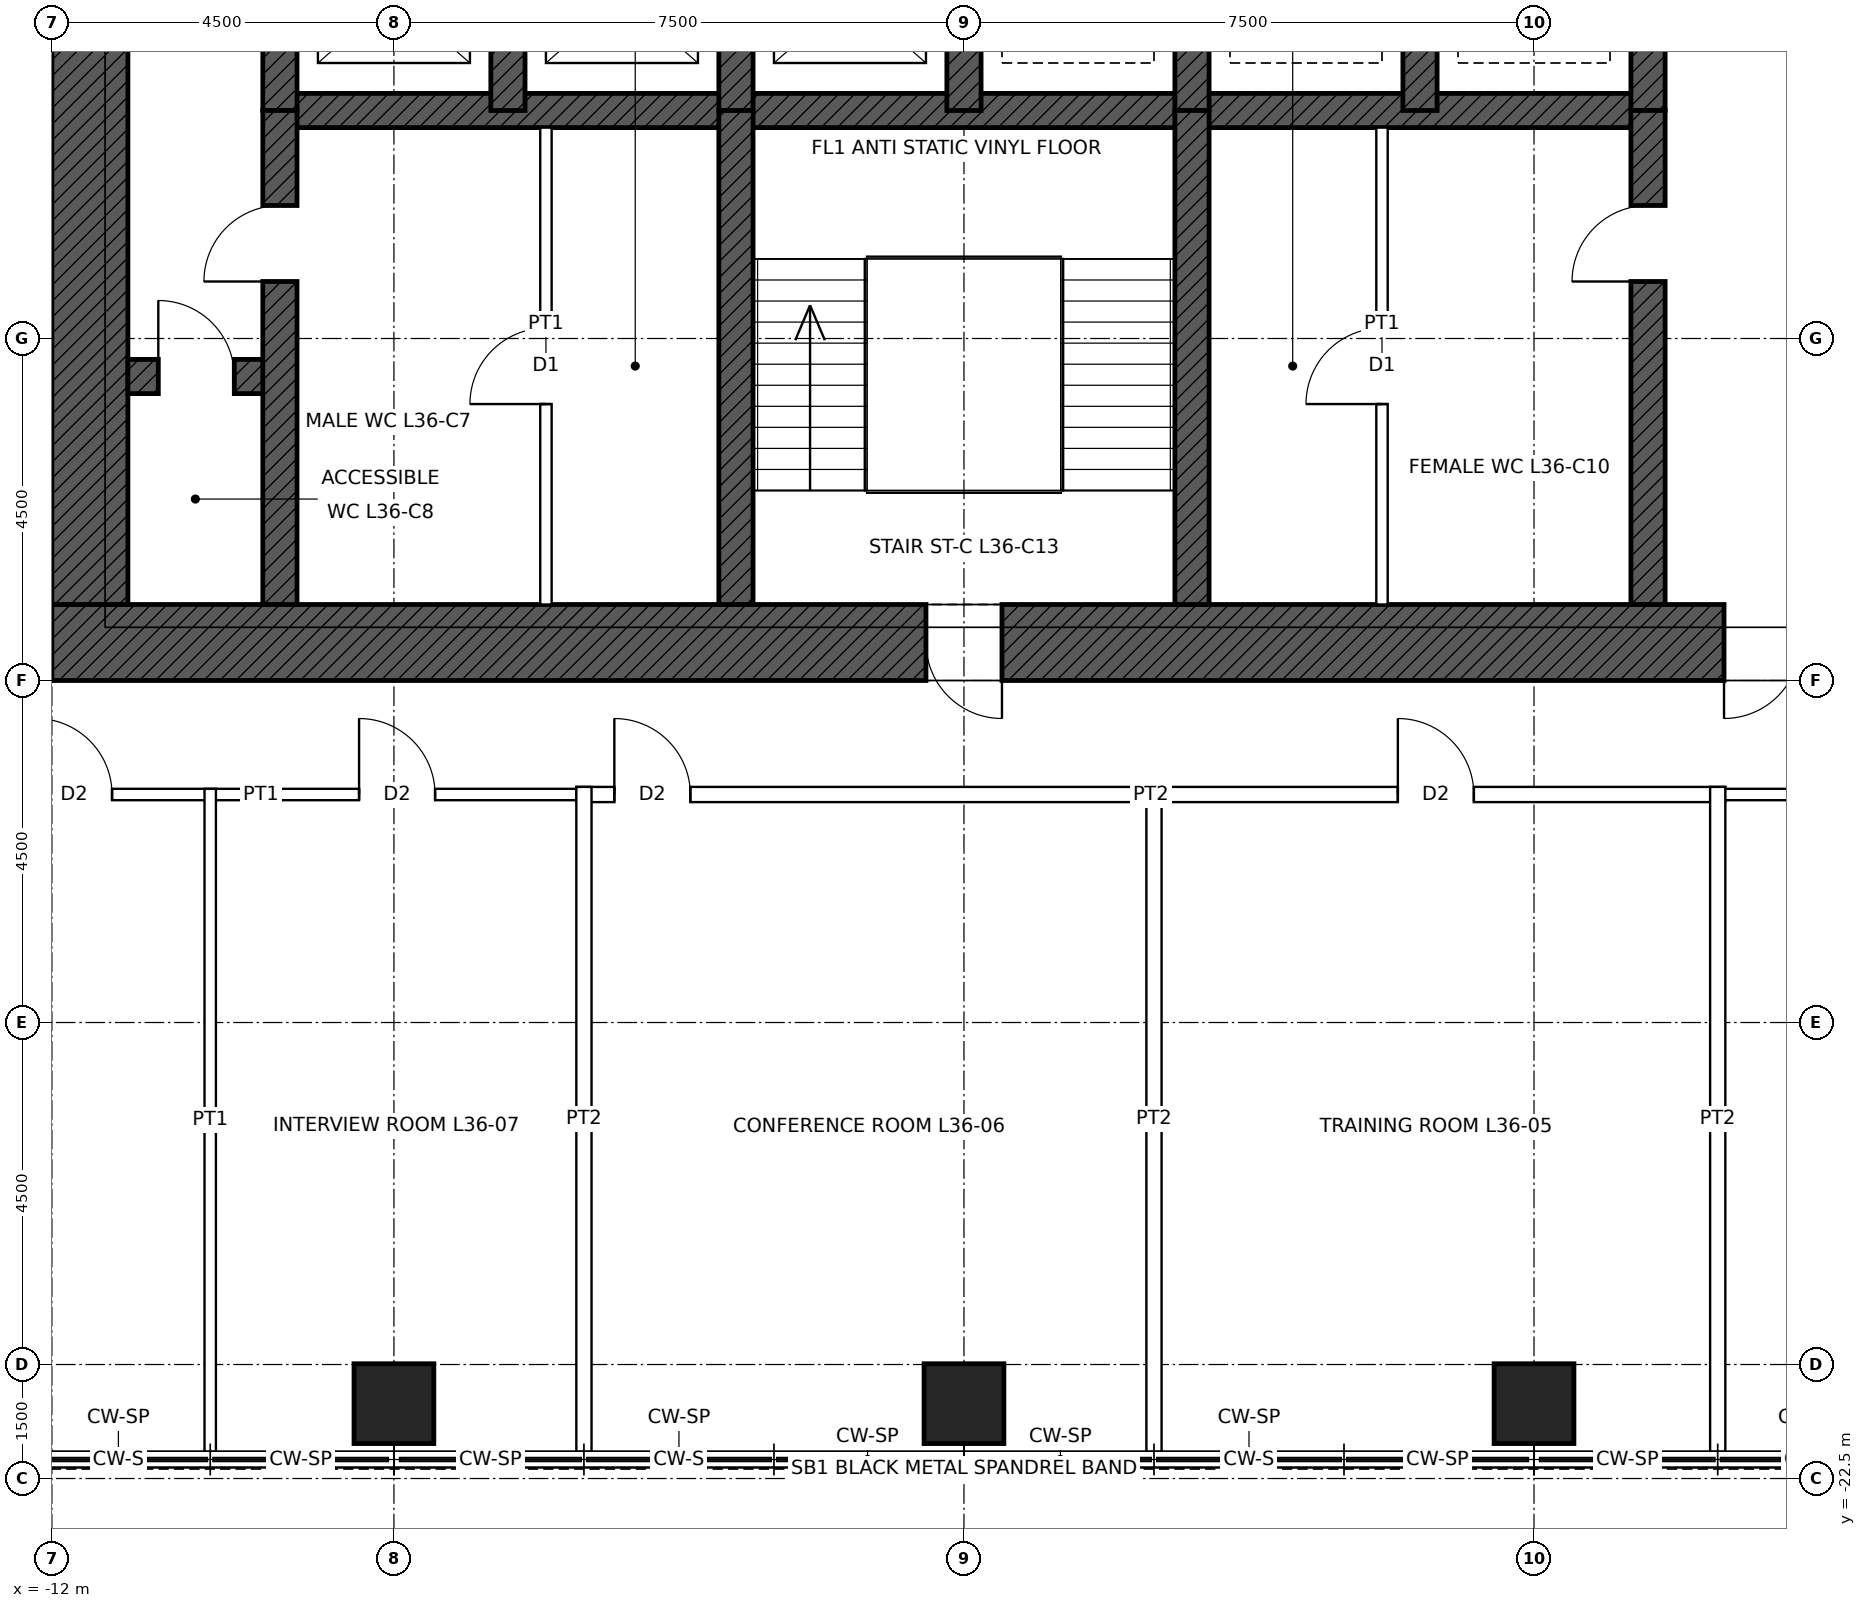
"""IFC4 building model, lengths in metres.
Left out: names, types, materials, properties, quantities, classifications, styles, units other than length and angle.
Written with IfcOpenShell. Run it as: python <this file> out.ifc"""

import sys

from ifc_helpers import new_model, si_unit, direction, frame, frame_2d, origin, origin_2d, place, context, subcontext, project, spatial, rectangle, hollow_rectangle, extrude, element, fill, save


model = new_model("IFC4")
c1 = context("Model", 3, precision=1e-05, world=origin(), true_north=direction((0.0, 1.0)))
c2 = subcontext(c1, "Body", "Model", "MODEL_VIEW")
j1 = project(units=[si_unit("LENGTHUNIT", "METRE"), si_unit("PLANEANGLEUNIT", "RADIAN")], contexts=[c1])
p1 = place(None, origin())
s1 = spatial("IfcSite", under=j1, at=p1, CompositionType="ELEMENT")
p2 = place(p1, origin())
s2 = spatial("IfcBuilding", under=s1, at=p2, CompositionType="ELEMENT")
p3 = place(p2, frame((0.0, 0.0, 177.9)))
s3 = spatial("IfcBuildingStorey", under=s2, at=p3, CompositionType="ELEMENT", Elevation=177.9)
p4 = place(p3, frame((7.5, -21.515, 0.0), z_axis=(0.0, 0.0, 1.0), x_axis=(1.0, 0.0, 0.0)))
e1 = element("IfcColumn", 1, at=p4, inside=s3, PredefinedType="COLUMN", context=c2, shape_type="SweptSolid", body=[
    extrude(hollow_rectangle(XDim=1.05, YDim=1.05, WallThickness=0.075, at=origin_2d()), origin(), (0.0, 0.0, 1.0), 4.0),
])
p5 = place(p3, frame((0.0, -21.515, 0.0), z_axis=(0.0, 0.0, 1.0), x_axis=(1.0, 0.0, 0.0)))
e2 = element("IfcColumn", 2, at=p5, inside=s3, PredefinedType="COLUMN", context=c2, shape_type="SweptSolid", body=[
    extrude(hollow_rectangle(XDim=1.05, YDim=1.05, WallThickness=0.07, at=origin_2d()), origin(), (0.0, 0.0, 1.0), 4.0),
])
p6 = place(p3, frame((-7.5, -21.515, 0.0), z_axis=(0.0, 0.0, 1.0), x_axis=(1.0, 0.0, 0.0)))
e3 = element("IfcColumn", 3, at=p6, inside=s3, PredefinedType="COLUMN", context=c2, shape_type="SweptSolid", body=[
    extrude(hollow_rectangle(XDim=1.05, YDim=1.05, WallThickness=0.075, at=origin_2d()), origin(), (0.0, 0.0, 1.0), 4.0),
])
p7 = place(p3, frame((12.0, -11.5, 0.0), z_axis=(0.0, 0.0, 1.0), x_axis=(-1.0, 0.0, 0.0)))
e4 = element("IfcWall", 4, at=p7, inside=s3, PredefinedType="SHEAR", context=c2, shape_type="SweptSolid", body=[
    extrude(rectangle(XDim=24.0, YDim=1.0, at=frame_2d((12.0, 0.0))), origin(), (0.0, 0.0, 1.0), 4.0),
])
p8 = place(p7, frame((11.5, 0.0, 0.0)))
e5 = element("IfcOpeningElement", 5, at=p8, cuts=e4, PredefinedType="OPENING", context=c2, shape_type="SweptSolid", body=[
    extrude(rectangle(XDim=1.0, YDim=2.1, at=frame_2d((0.5, 1.05))), frame((0.0, 0.51, 0.0), z_axis=(0.0, -1.0, 0.0), x_axis=(1.0, 0.0, 0.0)), (0.0, 0.0, 1.0), 1.02),
])
p9 = place(p7, frame((1.0, 0.0, 0.0)))
e6 = element("IfcOpeningElement", 6, at=p9, cuts=e4, PredefinedType="OPENING", context=c2, shape_type="SweptSolid", body=[
    extrude(rectangle(XDim=1.0, YDim=2.4, at=frame_2d((0.5, 1.2))), frame((0.0, 0.51, 0.0), z_axis=(0.0, -1.0, 0.0), x_axis=(1.0, 0.0, 0.0)), (0.0, 0.0, 1.0), 1.02),
])
p10 = place(p3, frame((-11.5, -11.0, 0.0), z_axis=(0.0, 0.0, 1.0), x_axis=(0.0, 1.0, 0.0)))
e7 = element("IfcWall", 7, at=p10, inside=s3, PredefinedType="SHEAR", context=c2, shape_type="SweptSolid", body=[
    extrude(rectangle(XDim=22.0, YDim=1.0, at=frame_2d((11.0, 0.0))), origin(), (0.0, 0.0, 1.0), 4.0),
])
p11 = place(p10, frame((10.5, 0.0, 0.0)))
e8 = element("IfcOpeningElement", 8, at=p11, cuts=e7, PredefinedType="OPENING", context=c2, shape_type="SweptSolid", body=[
    extrude(rectangle(XDim=1.0, YDim=2.4, at=frame_2d((0.5, 1.2))), frame((0.0, 0.51, 0.0), z_axis=(0.0, -1.0, 0.0), x_axis=(1.0, 0.0, 0.0)), (0.0, 0.0, 1.0), 1.02),
])
p12 = place(p3, frame((-9.0, -4.5, 0.0), z_axis=(0.0, 0.0, 1.0), x_axis=(1.0, 0.0, 0.0)))
e9 = element("IfcWall", 9, at=p12, inside=s3, PredefinedType="SHEAR", context=c2, shape_type="SweptSolid", body=[
    extrude(rectangle(XDim=18.0, YDim=0.45, at=frame_2d((9.0, 0.0))), origin(), (0.0, 0.0, 1.0), 4.0),
])
p13 = place(p3, frame((-11.0, -8.0, 0.0), z_axis=(0.0, 0.0, 1.0), x_axis=(1.0, 0.0, 0.0)))
e10 = element("IfcWall", 10, at=p13, inside=s3, PredefinedType="SHEAR", context=c2, shape_type="SweptSolid", body=[
    extrude(rectangle(XDim=2.0, YDim=0.45, at=frame_2d((1.0, 0.0))), origin(), (0.0, 0.0, 1.0), 4.0),
])
p14 = place(p13, frame((0.4, 0.0, 0.0)))
e11 = element("IfcOpeningElement", 11, at=p14, cuts=e10, PredefinedType="OPENING", context=c2, shape_type="SweptSolid", body=[
    extrude(rectangle(XDim=1.0, YDim=2.1, at=frame_2d((0.5, 1.05))), frame((0.0, 0.235, 0.0), z_axis=(0.0, -1.0, 0.0), x_axis=(1.0, 0.0, 0.0)), (0.0, 0.0, 1.0), 0.47),
])
for number, where, z_axis, x_axis in (
    (12, (-9.0, -4.5, 0.0), (0.0, 0.0, 1.0), (0.0, 1.0, 0.0)),
    (13, (9.0, -4.5, 0.0), (0.0, 0.0, 1.0), (0.0, 1.0, 0.0)),
    (14, (-6.0, -4.5, 0.0), (0.0, 0.0, 1.0), (0.0, 1.0, 0.0)),
    (15, (-3.0, -4.5, 0.0), (0.0, 0.0, 1.0), (0.0, 1.0, 0.0)),
    (16, (0.0, -4.5, 0.0), (0.0, 0.0, 1.0), (0.0, 1.0, 0.0)),
    (17, (3.0, -4.5, 0.0), (0.0, 0.0, 1.0), (0.0, 1.0, 0.0)),
    (18, (6.0, -4.5, 0.0), (0.0, 0.0, 1.0), (0.0, 1.0, 0.0)),
):
    element("IfcWall", number, at=place(p3, frame(where, z_axis=z_axis, x_axis=x_axis)), inside=s3, PredefinedType="SHEAR", context=c2, shape_type="SweptSolid", body=[
        extrude(rectangle(XDim=3.0, YDim=0.45, at=frame_2d((1.5, 0.0))), origin(), (0.0, 0.0, 1.0), 4.0),
    ])
p15 = place(p3, frame((-9.0, -11.0, 0.0), z_axis=(0.0, 0.0, 1.0), x_axis=(0.0, 1.0, 0.0)))
e19 = element("IfcWall", 19, at=p15, inside=s3, PredefinedType="SHEAR", context=c2, shape_type="SweptSolid", body=[
    extrude(rectangle(XDim=6.5, YDim=0.45, at=frame_2d((3.25, 0.0))), origin(), (0.0, 0.0, 1.0), 4.0),
])
p16 = place(p15, frame((4.25, 0.0, 0.0)))
e20 = element("IfcOpeningElement", 20, at=p16, cuts=e19, PredefinedType="OPENING", context=c2, shape_type="SweptSolid", body=[
    extrude(rectangle(XDim=1.0, YDim=2.1, at=frame_2d((0.5, 1.05))), frame((0.0, 0.235, 0.0), z_axis=(0.0, -1.0, 0.0), x_axis=(1.0, 0.0, 0.0)), (0.0, 0.0, 1.0), 0.47),
])
p17 = place(p3, frame((9.0, -11.0, 0.0), z_axis=(0.0, 0.0, 1.0), x_axis=(0.0, 1.0, 0.0)))
e21 = element("IfcWall", 21, at=p17, inside=s3, PredefinedType="SHEAR", context=c2, shape_type="SweptSolid", body=[
    extrude(rectangle(XDim=6.5, YDim=0.45, at=frame_2d((3.25, 0.0))), origin(), (0.0, 0.0, 1.0), 4.0),
])
p18 = place(p17, frame((4.25, 0.0, 0.0)))
e22 = element("IfcOpeningElement", 22, at=p18, cuts=e21, PredefinedType="OPENING", context=c2, shape_type="SweptSolid", body=[
    extrude(rectangle(XDim=1.0, YDim=2.1, at=frame_2d((0.5, 1.05))), frame((0.0, 0.235, 0.0), z_axis=(0.0, -1.0, 0.0), x_axis=(1.0, 0.0, 0.0)), (0.0, 0.0, 1.0), 0.47),
])
for number, where, z_axis, x_axis in (
    (23, (-3.0, -11.0, 0.0), (0.0, 0.0, 1.0), (0.0, 1.0, 0.0)),
    (24, (3.0, -11.0, 0.0), (0.0, 0.0, 1.0), (0.0, 1.0, 0.0)),
):
    element("IfcWall", number, at=place(p3, frame(where, z_axis=z_axis, x_axis=x_axis)), inside=s3, PredefinedType="SHEAR", context=c2, shape_type="SweptSolid", body=[
        extrude(rectangle(XDim=6.5, YDim=0.45, at=frame_2d((3.25, 0.0))), origin(), (0.0, 0.0, 1.0), 4.0),
    ])
p19 = place(p3, frame((-13.575, -13.5, 0.0), z_axis=(0.0, 0.0, 1.0), x_axis=(1.0, 0.0, 0.0)))
e25 = element("IfcWall", 25, at=p19, inside=s3, PredefinedType="PARTITIONING", context=c2, shape_type="SweptSolid", body=[
    extrude(rectangle(XDim=8.65, YDim=0.15, at=frame_2d((4.325, 0.0))), origin(), (0.0, 0.0, 1.0), 3.85),
])
p20 = place(p19, frame((5.616, 0.0, 0.0)))
e26 = element("IfcOpeningElement", 26, at=p20, cuts=e25, PredefinedType="OPENING", context=c2, shape_type="SweptSolid", body=[
    extrude(rectangle(XDim=1.0, YDim=2.1, at=frame_2d((0.5, 1.05))), frame((0.0, 0.085, 0.0), z_axis=(0.0, -1.0, 0.0), x_axis=(1.0, 0.0, 0.0)), (0.0, 0.0, 1.0), 0.17),
])
p21 = place(p19, frame((1.366, 0.0, 0.0)))
e27 = element("IfcOpeningElement", 27, at=p21, cuts=e25, PredefinedType="OPENING", context=c2, shape_type="SweptSolid", body=[
    extrude(rectangle(XDim=1.0, YDim=2.1, at=frame_2d((0.5, 1.05))), frame((0.0, 0.085, 0.0), z_axis=(0.0, -1.0, 0.0), x_axis=(1.0, 0.0, 0.0)), (0.0, 0.0, 1.0), 0.17),
])
p22 = place(p3, frame((-5.1, -13.5, 0.0), z_axis=(0.0, 0.0, 1.0), x_axis=(1.0, 0.0, 0.0)))
e28 = element("IfcWall", 28, at=p22, inside=s3, PredefinedType="PARTITIONING", context=c2, shape_type="SweptSolid", body=[
    extrude(rectangle(XDim=15.117, YDim=0.2, at=frame_2d((7.559, 0.0))), origin(), (0.0, 0.0, 1.0), 3.85),
])
p23 = place(p22, frame((10.809, 0.0, 0.0)))
e29 = element("IfcOpeningElement", 29, at=p23, cuts=e28, PredefinedType="OPENING", context=c2, shape_type="SweptSolid", body=[
    extrude(rectangle(XDim=1.0, YDim=2.1, at=frame_2d((0.5, 1.05))), frame((0.0, 0.11, 0.0), z_axis=(0.0, -1.0, 0.0), x_axis=(1.0, 0.0, 0.0)), (0.0, 0.0, 1.0), 0.22),
])
p24 = place(p22, frame((0.5, 0.0, 0.0)))
e30 = element("IfcOpeningElement", 30, at=p24, cuts=e28, PredefinedType="OPENING", context=c2, shape_type="SweptSolid", body=[
    extrude(rectangle(XDim=1.0, YDim=2.1, at=frame_2d((0.5, 1.05))), frame((0.0, 0.11, 0.0), z_axis=(0.0, -1.0, 0.0), x_axis=(1.0, 0.0, 0.0)), (0.0, 0.0, 1.0), 0.22),
])
p25 = place(p3, frame((9.842, -13.5, 0.0), z_axis=(0.0, 0.0, 1.0), x_axis=(1.0, 0.0, 0.0)))
e31 = element("IfcWall", 31, at=p25, inside=s3, PredefinedType="PARTITIONING", context=c2, shape_type="SweptSolid", body=[
    extrude(rectangle(XDim=3.733, YDim=0.15, at=frame_2d((1.866, 0.0))), origin(), (0.0, 0.0, 1.0), 3.85),
])
p26 = place(p25, frame((1.901, 0.0, 0.0)))
e32 = element("IfcOpeningElement", 32, at=p26, cuts=e31, PredefinedType="OPENING", context=c2, shape_type="SweptSolid", body=[
    extrude(rectangle(XDim=1.0, YDim=2.1, at=frame_2d((0.5, 1.05))), frame((0.0, 0.085, 0.0), z_axis=(0.0, -1.0, 0.0), x_axis=(1.0, 0.0, 0.0)), (0.0, 0.0, 1.0), 0.17),
])
p27 = place(p3, frame((-9.917, -22.15, 0.0), z_axis=(0.0, 0.0, 1.0), x_axis=(0.0, 1.0, 0.0)))
e33 = element("IfcWall", 33, at=p27, inside=s3, PredefinedType="PARTITIONING", context=c2, shape_type="SweptSolid", body=[
    extrude(rectangle(XDim=8.725, YDim=0.15, at=frame_2d((4.362, 0.0))), origin(), (0.0, 0.0, 1.0), 3.85),
])
for number, where, z_axis, x_axis in (
    (34, (-5.0, -22.15, 0.0), (0.0, 0.0, 1.0), (0.0, 1.0, 0.0)),
    (35, (2.5, -22.15, 0.0), (0.0, 0.0, 1.0), (0.0, 1.0, 0.0)),
    (36, (9.917, -22.15, 0.0), (0.0, 0.0, 1.0), (0.0, 1.0, 0.0)),
):
    element("IfcWall", number, at=place(p3, frame(where, z_axis=z_axis, x_axis=x_axis)), inside=s3, PredefinedType="PARTITIONING", context=c2, shape_type="SweptSolid", body=[
        extrude(rectangle(XDim=8.75, YDim=0.2, at=frame_2d((4.375, 0.0))), origin(), (0.0, 0.0, 1.0), 3.85),
    ])
p28 = place(p3, frame((-5.5, -11.0, 0.0), z_axis=(0.0, 0.0, 1.0), x_axis=(0.0, 1.0, 0.0)))
e37 = element("IfcWall", 37, at=p28, inside=s3, PredefinedType="PARTITIONING", context=c2, shape_type="SweptSolid", body=[
    extrude(rectangle(XDim=6.275, YDim=0.15, at=frame_2d((3.137, 0.0))), origin(), (0.0, 0.0, 1.0), 3.75),
])
p29 = place(p28, frame((2.637, 0.0, 0.0)))
e38 = element("IfcOpeningElement", 38, at=p29, cuts=e37, PredefinedType="OPENING", context=c2, shape_type="SweptSolid", body=[
    extrude(rectangle(XDim=1.0, YDim=2.1, at=frame_2d((0.5, 1.05))), frame((0.0, 0.085, 0.0), z_axis=(0.0, -1.0, 0.0), x_axis=(1.0, 0.0, 0.0)), (0.0, 0.0, 1.0), 0.17),
])
p30 = place(p3, frame((5.5, -11.0, 0.0), z_axis=(0.0, 0.0, 1.0), x_axis=(0.0, 1.0, 0.0)))
e39 = element("IfcWall", 39, at=p30, inside=s3, PredefinedType="PARTITIONING", context=c2, shape_type="SweptSolid", body=[
    extrude(rectangle(XDim=6.275, YDim=0.15, at=frame_2d((3.137, 0.0))), origin(), (0.0, 0.0, 1.0), 3.75),
])
p31 = place(p30, frame((2.637, 0.0, 0.0)))
e40 = element("IfcOpeningElement", 40, at=p31, cuts=e39, PredefinedType="OPENING", context=c2, shape_type="SweptSolid", body=[
    extrude(rectangle(XDim=1.0, YDim=2.1, at=frame_2d((0.5, 1.05))), frame((0.0, 0.085, 0.0), z_axis=(0.0, -1.0, 0.0), x_axis=(1.0, 0.0, 0.0)), (0.0, 0.0, 1.0), 0.17),
])
p32 = place(p8, origin())
e41 = element("IfcDoor", 41, at=p32, inside=s3, OperationType="SINGLE_SWING_LEFT", PredefinedType="DOOR", context=c2, shape_type="SweptSolid", body=[
    extrude(rectangle(XDim=1.0, YDim=2.1, at=frame_2d((0.5, 1.05))), frame((0.0, 0.485, 0.0), z_axis=(0.0, -1.0, 0.0), x_axis=(1.0, 0.0, 0.0)), (0.0, 0.0, 1.0), 0.05),
])
fill(e5, e41)
p33 = place(p9, origin())
e42 = element("IfcDoor", 42, at=p33, inside=s3, OperationType="SINGLE_SWING_RIGHT", PredefinedType="DOOR", context=c2, shape_type="SweptSolid", body=[
    extrude(rectangle(XDim=1.0, YDim=2.4, at=frame_2d((0.5, 1.2))), frame((0.0, 0.485, 0.0), z_axis=(0.0, -1.0, 0.0), x_axis=(1.0, 0.0, 0.0)), (0.0, 0.0, 1.0), 0.05),
])
fill(e6, e42)
p34 = place(p16, origin())
e43 = element("IfcDoor", 43, at=p34, inside=s3, OperationType="SINGLE_SWING_LEFT", PredefinedType="DOOR", context=c2, shape_type="SweptSolid", body=[
    extrude(rectangle(XDim=1.0, YDim=2.1, at=frame_2d((0.5, 1.05))), frame((0.0, 0.025, 0.0), z_axis=(0.0, -1.0, 0.0), x_axis=(1.0, 0.0, 0.0)), (0.0, 0.0, 1.0), 0.05),
])
fill(e20, e43)
p35 = place(p18, origin())
e44 = element("IfcDoor", 44, at=p35, inside=s3, OperationType="SINGLE_SWING_LEFT", PredefinedType="DOOR", context=c2, shape_type="SweptSolid", body=[
    extrude(rectangle(XDim=1.0, YDim=2.1, at=frame_2d((0.5, 1.05))), frame((0.0, 0.025, 0.0), z_axis=(0.0, -1.0, 0.0), x_axis=(1.0, 0.0, 0.0)), (0.0, 0.0, 1.0), 0.05),
])
fill(e22, e44)
p36 = place(p14, origin())
e45 = element("IfcDoor", 45, at=p36, inside=s3, OperationType="SINGLE_SWING_LEFT", PredefinedType="DOOR", context=c2, shape_type="SweptSolid", body=[
    extrude(rectangle(XDim=1.0, YDim=2.1, at=frame_2d((0.5, 1.05))), frame((0.0, 0.025, 0.0), z_axis=(0.0, -1.0, 0.0), x_axis=(1.0, 0.0, 0.0)), (0.0, 0.0, 1.0), 0.05),
])
fill(e11, e45)
p37 = place(p29, origin())
e46 = element("IfcDoor", 46, at=p37, inside=s3, OperationType="SINGLE_SWING_LEFT", PredefinedType="DOOR", context=c2, shape_type="SweptSolid", body=[
    extrude(rectangle(XDim=1.0, YDim=2.1, at=frame_2d((0.5, 1.05))), frame((0.0, 0.025, 0.0), z_axis=(0.0, -1.0, 0.0), x_axis=(1.0, 0.0, 0.0)), (0.0, 0.0, 1.0), 0.05),
])
fill(e38, e46)
p38 = place(p31, origin())
e47 = element("IfcDoor", 47, at=p38, inside=s3, OperationType="SINGLE_SWING_LEFT", PredefinedType="DOOR", context=c2, shape_type="SweptSolid", body=[
    extrude(rectangle(XDim=1.0, YDim=2.1, at=frame_2d((0.5, 1.05))), frame((0.0, 0.025, 0.0), z_axis=(0.0, -1.0, 0.0), x_axis=(1.0, 0.0, 0.0)), (0.0, 0.0, 1.0), 0.05),
])
fill(e40, e47)
p39 = place(p23, origin())
e48 = element("IfcDoor", 48, at=p39, inside=s3, OperationType="SINGLE_SWING_LEFT", PredefinedType="DOOR", context=c2, shape_type="SweptSolid", body=[
    extrude(rectangle(XDim=1.0, YDim=2.1, at=frame_2d((0.5, 1.05))), frame((0.0, 0.025, 0.0), z_axis=(0.0, -1.0, 0.0), x_axis=(1.0, 0.0, 0.0)), (0.0, 0.0, 1.0), 0.05),
])
fill(e29, e48)
p40 = place(p24, origin())
e49 = element("IfcDoor", 49, at=p40, inside=s3, OperationType="SINGLE_SWING_LEFT", PredefinedType="DOOR", context=c2, shape_type="SweptSolid", body=[
    extrude(rectangle(XDim=1.0, YDim=2.1, at=frame_2d((0.5, 1.05))), frame((0.0, 0.025, 0.0), z_axis=(0.0, -1.0, 0.0), x_axis=(1.0, 0.0, 0.0)), (0.0, 0.0, 1.0), 0.05),
])
fill(e30, e49)
p41 = place(p20, origin())
e50 = element("IfcDoor", 50, at=p41, inside=s3, OperationType="SINGLE_SWING_LEFT", PredefinedType="DOOR", context=c2, shape_type="SweptSolid", body=[
    extrude(rectangle(XDim=1.0, YDim=2.1, at=frame_2d((0.5, 1.05))), frame((0.0, 0.025, 0.0), z_axis=(0.0, -1.0, 0.0), x_axis=(1.0, 0.0, 0.0)), (0.0, 0.0, 1.0), 0.05),
])
fill(e26, e50)
p42 = place(p21, origin())
e51 = element("IfcDoor", 51, at=p42, inside=s3, OperationType="SINGLE_SWING_LEFT", PredefinedType="DOOR", context=c2, shape_type="SweptSolid", body=[
    extrude(rectangle(XDim=1.0, YDim=2.1, at=frame_2d((0.5, 1.05))), frame((0.0, 0.025, 0.0), z_axis=(0.0, -1.0, 0.0), x_axis=(1.0, 0.0, 0.0)), (0.0, 0.0, 1.0), 0.05),
])
fill(e27, e51)
save(model, sys.argv[1])
